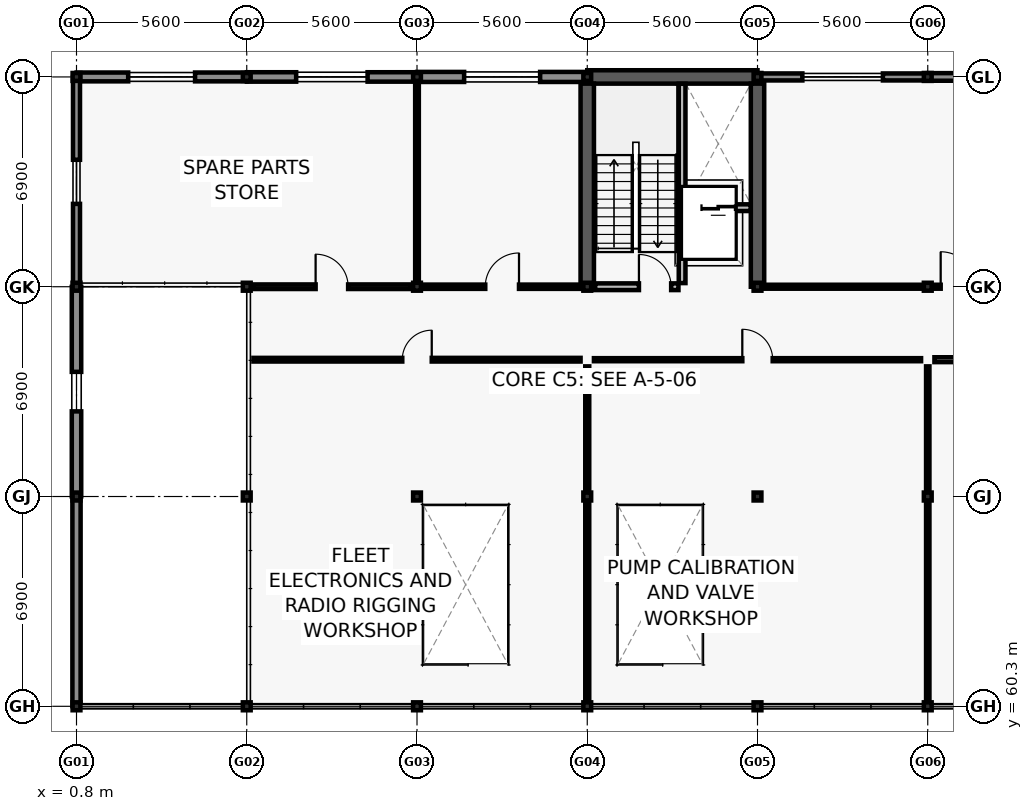
"""IFC4 building model, lengths in metres.
Left out: names, types, materials, properties, quantities, classifications, styles, units other than length and angle.
Written with IfcOpenShell. Run it as: python <this file> out.ifc"""

import sys

from ifc_helpers import new_model, si_unit, direction, frame, frame_2d, origin, origin_2d, place, context, subcontext, project, spatial, rectangle, i_section, extrude, element, fill, save


model = new_model("IFC4")
c1 = context("Model", 3, precision=1e-05, world=origin(), true_north=direction((0.0, 1.0)))
c2 = subcontext(c1, "Body", "Model", "MODEL_VIEW")
j1 = project(units=[si_unit("LENGTHUNIT", "METRE"), si_unit("PLANEANGLEUNIT", "RADIAN")], contexts=[c1])
p1 = place(None, origin())
s1 = spatial("IfcSite", under=j1, at=p1, CompositionType="ELEMENT")
p2 = place(p1, origin())
s2 = spatial("IfcBuilding", under=s1, at=p2, CompositionType="ELEMENT")
p3 = place(p2, frame((0.0, 0.0, 5.4)))
s3 = spatial("IfcBuildingStorey", under=s2, at=p3, CompositionType="ELEMENT", Elevation=5.4)
for number, where, z_axis, x_axis in (
    (1, (0.8, 60.3, 0.0), (0.0, 0.0, 1.0), (1.0, 0.0, 0.0)),
    (2, (0.8, 67.2, 0.0), (0.0, 0.0, 1.0), (1.0, 0.0, 0.0)),
    (3, (0.8, 74.1, 0.0), (0.0, 0.0, 1.0), (1.0, 0.0, 0.0)),
    (4, (0.8, 81.0, 0.0), (0.0, 0.0, 1.0), (1.0, 0.0, 0.0)),
    (5, (6.4, 60.3, 0.0), (0.0, 0.0, 1.0), (1.0, 0.0, 0.0)),
    (6, (6.4, 67.2, 0.0), (0.0, 0.0, 1.0), (1.0, 0.0, 0.0)),
    (7, (6.4, 74.1, 0.0), (0.0, 0.0, 1.0), (1.0, 0.0, 0.0)),
    (8, (6.4, 81.0, 0.0), (0.0, 0.0, 1.0), (1.0, 0.0, 0.0)),
    (9, (12.0, 60.3, 0.0), (0.0, 0.0, 1.0), (1.0, 0.0, 0.0)),
    (10, (12.0, 67.2, 0.0), (0.0, 0.0, 1.0), (1.0, 0.0, 0.0)),
    (11, (12.0, 74.1, 0.0), (0.0, 0.0, 1.0), (1.0, 0.0, 0.0)),
    (12, (12.0, 81.0, 0.0), (0.0, 0.0, 1.0), (1.0, 0.0, 0.0)),
    (13, (17.6, 60.3, 0.0), (0.0, 0.0, 1.0), (1.0, 0.0, 0.0)),
    (14, (17.6, 67.2, 0.0), (0.0, 0.0, 1.0), (1.0, 0.0, 0.0)),
    (15, (17.6, 74.1, 0.0), (0.0, 0.0, 1.0), (1.0, 0.0, 0.0)),
    (16, (17.6, 81.0, 0.0), (0.0, 0.0, 1.0), (1.0, 0.0, 0.0)),
    (17, (23.2, 60.3, 0.0), (0.0, 0.0, 1.0), (1.0, 0.0, 0.0)),
    (18, (23.2, 67.2, 0.0), (0.0, 0.0, 1.0), (1.0, 0.0, 0.0)),
    (19, (23.2, 74.1, 0.0), (0.0, 0.0, 1.0), (1.0, 0.0, 0.0)),
    (20, (23.2, 81.0, 0.0), (0.0, 0.0, 1.0), (1.0, 0.0, 0.0)),
    (21, (28.8, 60.3, 0.0), (0.0, 0.0, 1.0), (1.0, 0.0, 0.0)),
    (22, (28.8, 67.2, 0.0), (0.0, 0.0, 1.0), (1.0, 0.0, 0.0)),
    (23, (28.8, 74.1, 0.0), (0.0, 0.0, 1.0), (1.0, 0.0, 0.0)),
    (24, (28.8, 81.0, 0.0), (0.0, 0.0, 1.0), (1.0, 0.0, 0.0)),
):
    element("IfcColumn", number, at=place(p3, frame(where, z_axis=z_axis, x_axis=x_axis)), inside=s3, PredefinedType="COLUMN", context=c2, shape_type="SweptSolid", body=[
        extrude(i_section(OverallWidth=0.256, OverallDepth=0.26, WebThickness=0.01, FlangeThickness=0.017, FilletRadius=0.013, at=origin_2d()), origin(), (0.0, 0.0, 1.0), 4.2),
    ])
p4 = place(p3, frame((17.6, 81.0, 0.0), z_axis=(0.0, 0.0, 1.0), x_axis=(1.0, 0.0, 0.0)))
e25 = element("IfcWall", 25, at=p4, inside=s3, PredefinedType="SHEAR", context=c2, shape_type="SweptSolid", body=[
    extrude(rectangle(XDim=5.6, YDim=0.44, at=frame_2d((2.8, 0.0))), origin(), (0.0, 0.0, 1.0), 3.96),
])
for number, where, z_axis, x_axis in (
    (26, (17.6, 74.1, 0.0), (0.0, 0.0, 1.0), (0.0, 1.0, 0.0)),
    (27, (23.2, 74.1, 0.0), (0.0, 0.0, 1.0), (0.0, 1.0, 0.0)),
):
    element("IfcWall", number, at=place(p3, frame(where, z_axis=z_axis, x_axis=x_axis)), inside=s3, PredefinedType="SHEAR", context=c2, shape_type="SweptSolid", body=[
        extrude(rectangle(XDim=6.68, YDim=0.44, at=frame_2d((3.34, 0.0))), origin(), (0.0, 0.0, 1.0), 3.96),
    ])
p5 = place(p3, frame((0.805, 81.0, 0.0), z_axis=(0.0, 0.0, 1.0), x_axis=(1.0, 0.0, 0.0)))
e28 = element("IfcWall", 28, at=p5, inside=s3, PredefinedType="SOLIDWALL", context=c2, shape_type="SweptSolid", body=[
    extrude(rectangle(XDim=5.59, YDim=0.29, at=frame_2d((2.795, 0.0))), origin(), (0.0, 0.0, 1.0), 3.32),
])
p6 = place(p5, frame((1.695, 0.0, 0.8)))
e29 = element("IfcOpeningElement", 29, at=p6, cuts=e28, PredefinedType="OPENING", context=c2, shape_type="SweptSolid", body=[
    extrude(rectangle(XDim=2.2, YDim=1.8, at=frame_2d((1.1, 0.9))), frame((0.0, 0.155, 0.0), z_axis=(0.0, -1.0, 0.0), x_axis=(1.0, 0.0, 0.0)), (0.0, 0.0, 1.0), 0.31),
])
p7 = place(p3, frame((6.405, 81.0, 0.0), z_axis=(0.0, 0.0, 1.0), x_axis=(1.0, 0.0, 0.0)))
e30 = element("IfcWall", 30, at=p7, inside=s3, PredefinedType="SOLIDWALL", context=c2, shape_type="SweptSolid", body=[
    extrude(rectangle(XDim=5.59, YDim=0.31, at=frame_2d((2.795, 0.0))), origin(), (0.0, 0.0, 1.0), 3.32),
])
p8 = place(p7, frame((1.62, 0.0, 0.8)))
e31 = element("IfcOpeningElement", 31, at=p8, cuts=e30, PredefinedType="OPENING", context=c2, shape_type="SweptSolid", body=[
    extrude(rectangle(XDim=2.35, YDim=1.8, at=frame_2d((1.175, 0.9))), frame((0.0, 0.165, 0.0), z_axis=(0.0, -1.0, 0.0), x_axis=(1.0, 0.0, 0.0)), (0.0, 0.0, 1.0), 0.33),
])
p9 = place(p3, frame((12.005, 81.0, 0.0), z_axis=(0.0, 0.0, 1.0), x_axis=(1.0, 0.0, 0.0)))
e32 = element("IfcWall", 32, at=p9, inside=s3, PredefinedType="SOLIDWALL", context=c2, shape_type="SweptSolid", body=[
    extrude(rectangle(XDim=5.59, YDim=0.33, at=frame_2d((2.795, 0.0))), origin(), (0.0, 0.0, 1.0), 3.32),
])
p10 = place(p9, frame((1.545, 0.0, 0.8)))
e33 = element("IfcOpeningElement", 33, at=p10, cuts=e32, PredefinedType="OPENING", context=c2, shape_type="SweptSolid", body=[
    extrude(rectangle(XDim=2.5, YDim=1.8, at=frame_2d((1.25, 0.9))), frame((0.0, 0.175, 0.0), z_axis=(0.0, -1.0, 0.0), x_axis=(1.0, 0.0, 0.0)), (0.0, 0.0, 1.0), 0.35),
])
p11 = place(p3, frame((23.205, 81.0, 0.0), z_axis=(0.0, 0.0, 1.0), x_axis=(1.0, 0.0, 0.0)))
e34 = element("IfcWall", 34, at=p11, inside=s3, PredefinedType="SOLIDWALL", context=c2, shape_type="SweptSolid", body=[
    extrude(rectangle(XDim=5.59, YDim=0.23, at=frame_2d((2.795, 0.0))), origin(), (0.0, 0.0, 1.0), 3.32),
])
p12 = place(p11, frame((1.47, 0.0, 0.8)))
e35 = element("IfcOpeningElement", 35, at=p12, cuts=e34, PredefinedType="OPENING", context=c2, shape_type="SweptSolid", body=[
    extrude(rectangle(XDim=2.65, YDim=1.8, at=frame_2d((1.325, 0.9))), frame((0.0, 0.125, 0.0), z_axis=(0.0, -1.0, 0.0), x_axis=(1.0, 0.0, 0.0)), (0.0, 0.0, 1.0), 0.25),
])
p13 = place(p3, frame((28.805, 81.0, 0.0), z_axis=(0.0, 0.0, 1.0), x_axis=(1.0, 0.0, 0.0)))
e36 = element("IfcWall", 36, at=p13, inside=s3, PredefinedType="SOLIDWALL", context=c2, shape_type="SweptSolid", body=[
    extrude(rectangle(XDim=5.59, YDim=0.25, at=frame_2d((2.795, 0.0))), origin(), (0.0, 0.0, 1.0), 3.32),
])
p14 = place(p13, frame((1.395, 0.0, 0.8)))
e37 = element("IfcOpeningElement", 37, at=p14, cuts=e36, PredefinedType="OPENING", context=c2, shape_type="SweptSolid", body=[
    extrude(rectangle(XDim=2.8, YDim=1.8, at=frame_2d((1.4, 0.9))), frame((0.0, 0.135, 0.0), z_axis=(0.0, -1.0, 0.0), x_axis=(1.0, 0.0, 0.0)), (0.0, 0.0, 1.0), 0.27),
])
p15 = place(p3, frame((0.8, 60.305, 0.0), z_axis=(0.0, 0.0, 1.0), x_axis=(0.0, 1.0, 0.0)))
e38 = element("IfcWall", 38, at=p15, inside=s3, PredefinedType="SOLIDWALL", context=c2, shape_type="SweptSolid", body=[
    extrude(rectangle(XDim=6.89, YDim=0.27, at=frame_2d((3.445, 0.0))), origin(), (0.0, 0.0, 1.0), 3.32),
])
p16 = place(p3, frame((0.8, 67.205, 0.0), z_axis=(0.0, 0.0, 1.0), x_axis=(0.0, 1.0, 0.0)))
e39 = element("IfcWall", 39, at=p16, inside=s3, PredefinedType="SOLIDWALL", context=c2, shape_type="SweptSolid", body=[
    extrude(rectangle(XDim=6.89, YDim=0.31, at=frame_2d((3.445, 0.0))), origin(), (0.0, 0.0, 1.0), 3.32),
])
p17 = place(p16, frame((2.795, 0.0, 0.8)))
e40 = element("IfcOpeningElement", 40, at=p17, cuts=e39, PredefinedType="OPENING", context=c2, shape_type="SweptSolid", body=[
    extrude(rectangle(XDim=1.3, YDim=1.8, at=frame_2d((0.65, 0.9))), frame((0.0, 0.165, 0.0), z_axis=(0.0, -1.0, 0.0), x_axis=(1.0, 0.0, 0.0)), (0.0, 0.0, 1.0), 0.33),
])
p18 = place(p3, frame((0.8, 74.105, 0.0), z_axis=(0.0, 0.0, 1.0), x_axis=(0.0, 1.0, 0.0)))
e41 = element("IfcWall", 41, at=p18, inside=s3, PredefinedType="SOLIDWALL", context=c2, shape_type="SweptSolid", body=[
    extrude(rectangle(XDim=6.89, YDim=0.23, at=frame_2d((3.445, 0.0))), origin(), (0.0, 0.0, 1.0), 3.32),
])
p19 = place(p18, frame((2.72, 0.0, 0.8)))
e42 = element("IfcOpeningElement", 42, at=p19, cuts=e41, PredefinedType="OPENING", context=c2, shape_type="SweptSolid", body=[
    extrude(rectangle(XDim=1.45, YDim=1.8, at=frame_2d((0.725, 0.9))), frame((0.0, 0.125, 0.0), z_axis=(0.0, -1.0, 0.0), x_axis=(1.0, 0.0, 0.0)), (0.0, 0.0, 1.0), 0.25),
])
p20 = place(p3, frame((20.72, 74.22, 0.0), z_axis=(0.0, 0.0, 1.0), x_axis=(0.0, 1.0, 0.0)))
e43 = element("IfcWall", 43, at=p20, inside=s3, PredefinedType="SOLIDWALL", context=c2, shape_type="SweptSolid", body=[
    extrude(rectangle(XDim=6.555, YDim=0.22, at=frame_2d((3.277, 0.0))), origin(), (0.0, 0.0, 1.0), 3.96),
])
p21 = place(p3, frame((17.86, 74.1, 0.0), z_axis=(0.0, 0.0, 1.0), x_axis=(1.0, 0.0, 0.0)))
e44 = element("IfcWall", 44, at=p21, inside=s3, PredefinedType="SOLIDWALL", context=c2, shape_type="SweptSolid", body=[
    extrude(rectangle(XDim=2.74, YDim=0.22, at=frame_2d((1.37, 0.0))), origin(), (0.0, 0.0, 1.0), 3.32),
])
p22 = place(p21, frame((1.44, 0.0, 0.0)))
e45 = element("IfcOpeningElement", 45, at=p22, cuts=e44, PredefinedType="OPENING", context=c2, shape_type="SweptSolid", body=[
    extrude(rectangle(XDim=1.06, YDim=2.1, at=frame_2d((0.53, 1.05))), frame((0.0, 0.12, 0.0), z_axis=(0.0, -1.0, 0.0), x_axis=(1.0, 0.0, 0.0)), (0.0, 0.0, 1.0), 0.24),
])
p23 = place(p3, frame((20.84, 76.7, 0.0), z_axis=(0.0, 0.0, 1.0), x_axis=(1.0, 0.0, 0.0)))
e46 = element("IfcWall", 46, at=p23, inside=s3, PredefinedType="SOLIDWALL", context=c2, shape_type="SweptSolid", body=[
    extrude(rectangle(XDim=2.135, YDim=0.22, at=frame_2d((1.067, 0.0))), origin(), (0.0, 0.0, 1.0), 3.96),
])
p24 = place(p23, frame((0.518, 0.0, 0.0)))
e47 = element("IfcOpeningElement", 47, at=p24, cuts=e46, PredefinedType="OPENING", context=c2, shape_type="SweptSolid", body=[
    extrude(rectangle(XDim=1.1, YDim=2.1, at=frame_2d((0.55, 1.05))), frame((0.0, 0.12, 0.0), z_axis=(0.0, -1.0, 0.0), x_axis=(1.0, 0.0, 0.0)), (0.0, 0.0, 1.0), 0.24),
])
p25 = place(p3, frame((17.6, 60.52, 0.0), z_axis=(0.0, 0.0, 1.0), x_axis=(0.0, 1.0, 0.0)))
e48 = element("IfcWall", 48, at=p25, inside=s3, PredefinedType="PARTITIONING", context=c2, shape_type="SweptSolid", body=[
    extrude(rectangle(XDim=10.96, YDim=0.13, at=frame_2d((5.48, 0.0))), origin(), (0.0, 0.0, 1.0), 3.3),
])
p26 = place(p3, frame((6.62, 71.7, 0.0), z_axis=(0.0, 0.0, 1.0), x_axis=(1.0, 0.0, 0.0)))
e49 = element("IfcWall", 49, at=p26, inside=s3, PredefinedType="PARTITIONING", context=c2, shape_type="SweptSolid", body=[
    extrude(rectangle(XDim=10.76, YDim=0.12, at=frame_2d((5.38, 0.0))), origin(), (0.0, 0.0, 1.0), 3.3),
])
p27 = place(p26, frame((4.895, 0.0, 0.0)))
e50 = element("IfcOpeningElement", 50, at=p27, cuts=e49, PredefinedType="OPENING", context=c2, shape_type="SweptSolid", body=[
    extrude(rectangle(XDim=0.97, YDim=2.1, at=frame_2d((0.485, 1.05))), frame((0.0, 0.07, 0.0), z_axis=(0.0, -1.0, 0.0), x_axis=(1.0, 0.0, 0.0)), (0.0, 0.0, 1.0), 0.14),
])
p28 = place(p3, frame((28.8, 60.52, 0.0), z_axis=(0.0, 0.0, 1.0), x_axis=(0.0, 1.0, 0.0)))
e51 = element("IfcWall", 51, at=p28, inside=s3, PredefinedType="PARTITIONING", context=c2, shape_type="SweptSolid", body=[
    extrude(rectangle(XDim=10.96, YDim=0.11, at=frame_2d((5.48, 0.0))), origin(), (0.0, 0.0, 1.0), 3.3),
])
p29 = place(p3, frame((17.82, 71.7, 0.0), z_axis=(0.0, 0.0, 1.0), x_axis=(1.0, 0.0, 0.0)))
e52 = element("IfcWall", 52, at=p29, inside=s3, PredefinedType="PARTITIONING", context=c2, shape_type="SweptSolid", body=[
    extrude(rectangle(XDim=10.76, YDim=0.1, at=frame_2d((5.38, 0.0))), origin(), (0.0, 0.0, 1.0), 3.3),
])
p30 = place(p29, frame((4.88, 0.0, 0.0)))
e53 = element("IfcOpeningElement", 53, at=p30, cuts=e52, PredefinedType="OPENING", context=c2, shape_type="SweptSolid", body=[
    extrude(rectangle(XDim=1.0, YDim=2.12, at=frame_2d((0.5, 1.06))), frame((0.0, 0.06, 0.0), z_axis=(0.0, -1.0, 0.0), x_axis=(1.0, 0.0, 0.0)), (0.0, 0.0, 1.0), 0.12),
])
p31 = place(p3, frame((29.02, 71.7, 0.0), z_axis=(0.0, 0.0, 1.0), x_axis=(1.0, 0.0, 0.0)))
e54 = element("IfcWall", 54, at=p31, inside=s3, PredefinedType="PARTITIONING", context=c2, shape_type="SweptSolid", body=[
    extrude(rectangle(XDim=10.76, YDim=0.16, at=frame_2d((5.38, 0.0))), origin(), (0.0, 0.0, 1.0), 3.3),
])
p32 = place(p31, frame((4.865, 0.0, 0.0)))
e55 = element("IfcOpeningElement", 55, at=p32, cuts=e54, PredefinedType="OPENING", context=c2, shape_type="SweptSolid", body=[
    extrude(rectangle(XDim=1.03, YDim=2.06, at=frame_2d((0.515, 1.03))), frame((0.0, 0.09, 0.0), z_axis=(0.0, -1.0, 0.0), x_axis=(1.0, 0.0, 0.0)), (0.0, 0.0, 1.0), 0.18),
])
p33 = place(p3, frame((6.62, 74.1, 0.0), z_axis=(0.0, 0.0, 1.0), x_axis=(1.0, 0.0, 0.0)))
e56 = element("IfcWall", 56, at=p33, inside=s3, PredefinedType="PARTITIONING", context=c2, shape_type="SweptSolid", body=[
    extrude(rectangle(XDim=5.16, YDim=0.15, at=frame_2d((2.58, 0.0))), origin(), (0.0, 0.0, 1.0), 3.3),
])
p34 = place(p33, frame((2.045, 0.0, 0.0)))
e57 = element("IfcOpeningElement", 57, at=p34, cuts=e56, PredefinedType="OPENING", context=c2, shape_type="SweptSolid", body=[
    extrude(rectangle(XDim=1.07, YDim=2.08, at=frame_2d((0.535, 1.04))), frame((0.0, 0.085, 0.0), z_axis=(0.0, -1.0, 0.0), x_axis=(1.0, 0.0, 0.0)), (0.0, 0.0, 1.0), 0.17),
])
p35 = place(p3, frame((12.22, 74.1, 0.0), z_axis=(0.0, 0.0, 1.0), x_axis=(1.0, 0.0, 0.0)))
e58 = element("IfcWall", 58, at=p35, inside=s3, PredefinedType="PARTITIONING", context=c2, shape_type="SweptSolid", body=[
    extrude(rectangle(XDim=5.16, YDim=0.14, at=frame_2d((2.58, 0.0))), origin(), (0.0, 0.0, 1.0), 3.3),
])
p36 = place(p35, frame((2.025, 0.0, 0.0)))
e59 = element("IfcOpeningElement", 59, at=p36, cuts=e58, PredefinedType="OPENING", context=c2, shape_type="SweptSolid", body=[
    extrude(rectangle(XDim=1.11, YDim=2.1, at=frame_2d((0.555, 1.05))), frame((0.0, 0.08, 0.0), z_axis=(0.0, -1.0, 0.0), x_axis=(1.0, 0.0, 0.0)), (0.0, 0.0, 1.0), 0.16),
])
p37 = place(p3, frame((23.42, 74.1, 0.0), z_axis=(0.0, 0.0, 1.0), x_axis=(1.0, 0.0, 0.0)))
e60 = element("IfcWall", 60, at=p37, inside=s3, PredefinedType="PARTITIONING", context=c2, shape_type="SweptSolid", body=[
    extrude(rectangle(XDim=10.76, YDim=0.13, at=frame_2d((5.38, 0.0))), origin(), (0.0, 0.0, 1.0), 3.3),
])
p38 = place(p37, frame((5.805, 0.0, 0.0)))
e61 = element("IfcOpeningElement", 61, at=p38, cuts=e60, PredefinedType="OPENING", context=c2, shape_type="SweptSolid", body=[
    extrude(rectangle(XDim=1.15, YDim=2.12, at=frame_2d((0.575, 1.06))), frame((0.0, 0.075, 0.0), z_axis=(0.0, -1.0, 0.0), x_axis=(1.0, 0.0, 0.0)), (0.0, 0.0, 1.0), 0.15),
])
p39 = place(p3, frame((12.0, 74.32, 0.0), z_axis=(0.0, 0.0, 1.0), x_axis=(0.0, 1.0, 0.0)))
e62 = element("IfcWall", 62, at=p39, inside=s3, PredefinedType="PARTITIONING", context=c2, shape_type="SweptSolid", body=[
    extrude(rectangle(XDim=6.46, YDim=0.12, at=frame_2d((3.23, 0.0))), origin(), (0.0, 0.0, 1.0), 3.3),
])
p40 = place(p6, origin())
e63 = element("IfcWindow", 63, at=p40, inside=s3, PartitioningType="DOUBLE_PANEL_VERTICAL", PredefinedType="WINDOW", context=c2, shape_type="SweptSolid", body=[
    extrude(rectangle(XDim=2.2, YDim=1.8, at=frame_2d((1.1, 0.9))), frame((0.0, 0.03, 0.0), z_axis=(0.0, -1.0, 0.0), x_axis=(1.0, 0.0, 0.0)), (0.0, 0.0, 1.0), 0.06),
])
fill(e29, e63)
p41 = place(p8, origin())
e64 = element("IfcWindow", 64, at=p41, inside=s3, PartitioningType="DOUBLE_PANEL_VERTICAL", PredefinedType="WINDOW", context=c2, shape_type="SweptSolid", body=[
    extrude(rectangle(XDim=2.35, YDim=1.8, at=frame_2d((1.175, 0.9))), frame((0.0, 0.03, 0.0), z_axis=(0.0, -1.0, 0.0), x_axis=(1.0, 0.0, 0.0)), (0.0, 0.0, 1.0), 0.06),
])
fill(e31, e64)
p42 = place(p10, origin())
e65 = element("IfcWindow", 65, at=p42, inside=s3, PartitioningType="TRIPLE_PANEL_VERTICAL", PredefinedType="WINDOW", context=c2, shape_type="SweptSolid", body=[
    extrude(rectangle(XDim=2.5, YDim=1.8, at=frame_2d((1.25, 0.9))), frame((0.0, 0.03, 0.0), z_axis=(0.0, -1.0, 0.0), x_axis=(1.0, 0.0, 0.0)), (0.0, 0.0, 1.0), 0.06),
])
fill(e33, e65)
p43 = place(p12, origin())
e66 = element("IfcWindow", 66, at=p43, inside=s3, PartitioningType="TRIPLE_PANEL_VERTICAL", PredefinedType="WINDOW", context=c2, shape_type="SweptSolid", body=[
    extrude(rectangle(XDim=2.65, YDim=1.8, at=frame_2d((1.325, 0.9))), frame((0.0, 0.03, 0.0), z_axis=(0.0, -1.0, 0.0), x_axis=(1.0, 0.0, 0.0)), (0.0, 0.0, 1.0), 0.06),
])
fill(e35, e66)
p44 = place(p17, origin())
e67 = element("IfcWindow", 67, at=p44, inside=s3, PartitioningType="SINGLE_PANEL", PredefinedType="WINDOW", context=c2, shape_type="SweptSolid", body=[
    extrude(rectangle(XDim=1.3, YDim=1.8, at=frame_2d((0.65, 0.9))), frame((0.0, 0.03, 0.0), z_axis=(0.0, -1.0, 0.0), x_axis=(1.0, 0.0, 0.0)), (0.0, 0.0, 1.0), 0.06),
])
fill(e40, e67)
p45 = place(p19, origin())
e68 = element("IfcWindow", 68, at=p45, inside=s3, PartitioningType="SINGLE_PANEL", PredefinedType="WINDOW", context=c2, shape_type="SweptSolid", body=[
    extrude(rectangle(XDim=1.45, YDim=1.8, at=frame_2d((0.725, 0.9))), frame((0.0, 0.03, 0.0), z_axis=(0.0, -1.0, 0.0), x_axis=(1.0, 0.0, 0.0)), (0.0, 0.0, 1.0), 0.06),
])
fill(e42, e68)
p46 = place(p22, origin())
e69 = element("IfcDoor", 69, at=p46, inside=s3, OperationType="SINGLE_SWING_LEFT", PredefinedType="DOOR", context=c2, shape_type="SweptSolid", body=[
    extrude(rectangle(XDim=1.06, YDim=2.1, at=frame_2d((0.53, 1.05))), frame((0.0, 0.025, 0.0), z_axis=(0.0, -1.0, 0.0), x_axis=(1.0, 0.0, 0.0)), (0.0, 0.0, 1.0), 0.05),
])
fill(e45, e69)
p47 = place(p24, origin())
e70 = element("IfcDoor", 70, at=p47, inside=s3, OperationType="DOUBLE_DOOR_SLIDING", PredefinedType="DOOR", context=c2, shape_type="SweptSolid", body=[
    extrude(rectangle(XDim=1.1, YDim=2.1, at=frame_2d((0.55, 1.05))), frame((0.0, 0.025, 0.0), z_axis=(0.0, -1.0, 0.0), x_axis=(1.0, 0.0, 0.0)), (0.0, 0.0, 1.0), 0.05),
])
fill(e47, e70)
p48 = place(p27, origin())
e71 = element("IfcDoor", 71, at=p48, inside=s3, OperationType="SINGLE_SWING_RIGHT", PredefinedType="DOOR", context=c2, shape_type="SweptSolid", body=[
    extrude(rectangle(XDim=0.97, YDim=2.1, at=frame_2d((0.485, 1.05))), frame((0.0, 0.025, 0.0), z_axis=(0.0, -1.0, 0.0), x_axis=(1.0, 0.0, 0.0)), (0.0, 0.0, 1.0), 0.05),
])
fill(e50, e71)
p49 = place(p30, origin())
e72 = element("IfcDoor", 72, at=p49, inside=s3, OperationType="SINGLE_SWING_LEFT", PredefinedType="DOOR", context=c2, shape_type="SweptSolid", body=[
    extrude(rectangle(XDim=1.0, YDim=2.12, at=frame_2d((0.5, 1.06))), frame((0.0, 0.025, 0.0), z_axis=(0.0, -1.0, 0.0), x_axis=(1.0, 0.0, 0.0)), (0.0, 0.0, 1.0), 0.05),
])
fill(e53, e72)
p50 = place(p34, origin())
e73 = element("IfcDoor", 73, at=p50, inside=s3, OperationType="SINGLE_SWING_LEFT", PredefinedType="DOOR", context=c2, shape_type="SweptSolid", body=[
    extrude(rectangle(XDim=1.07, YDim=2.08, at=frame_2d((0.535, 1.04))), frame((0.0, 0.025, 0.0), z_axis=(0.0, -1.0, 0.0), x_axis=(1.0, 0.0, 0.0)), (0.0, 0.0, 1.0), 0.05),
])
fill(e57, e73)
p51 = place(p36, origin())
e74 = element("IfcDoor", 74, at=p51, inside=s3, OperationType="SINGLE_SWING_RIGHT", PredefinedType="DOOR", context=c2, shape_type="SweptSolid", body=[
    extrude(rectangle(XDim=1.11, YDim=2.1, at=frame_2d((0.555, 1.05))), frame((0.0, 0.025, 0.0), z_axis=(0.0, -1.0, 0.0), x_axis=(1.0, 0.0, 0.0)), (0.0, 0.0, 1.0), 0.05),
])
fill(e59, e74)
p52 = place(p38, origin())
e75 = element("IfcDoor", 75, at=p52, inside=s3, OperationType="SINGLE_SWING_LEFT", PredefinedType="DOOR", context=c2, shape_type="SweptSolid", body=[
    extrude(rectangle(XDim=1.15, YDim=2.12, at=frame_2d((0.575, 1.06))), frame((0.0, 0.025, 0.0), z_axis=(0.0, -1.0, 0.0), x_axis=(1.0, 0.0, 0.0)), (0.0, 0.0, 1.0), 0.05),
])
fill(e61, e75)
save(model, sys.argv[1])
